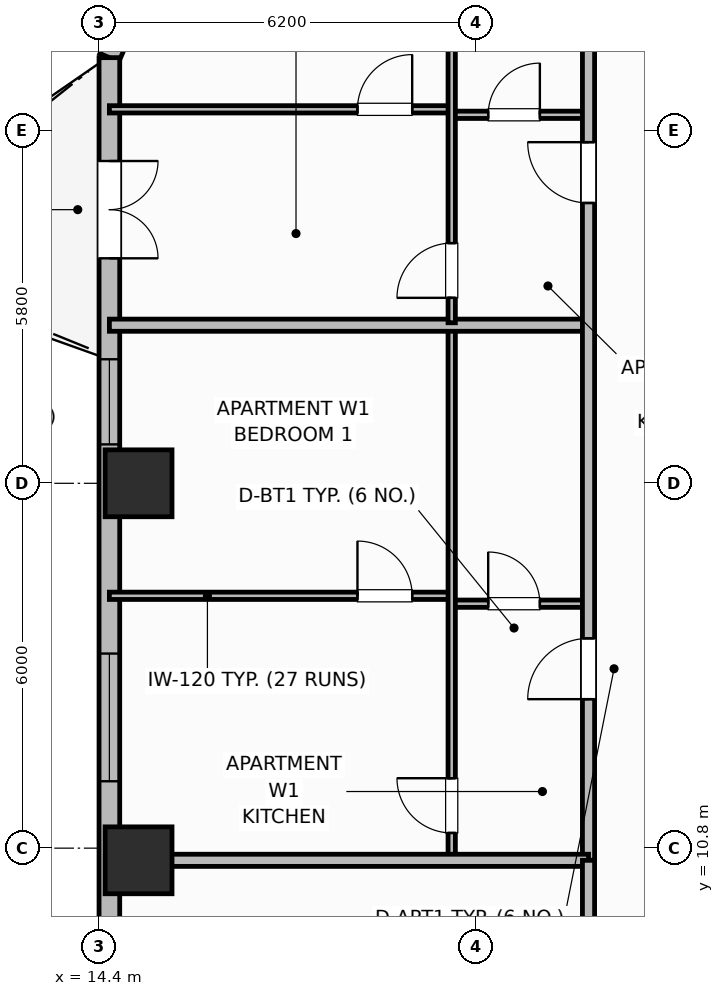
"""IFC4 building model, lengths in metres.
Left out: names, types, materials, properties, quantities, classifications, styles, units other than length and angle.
Written with IfcOpenShell. Run it as: python <this file> out.ifc"""

import sys

from ifc_helpers import new_model, si_unit, direction, frame, frame_2d, origin, origin_2d, place, context, subcontext, project, spatial, rectangle, extrude, element, fill, save


model = new_model("IFC4")
c1 = context("Model", 3, precision=1e-05, world=origin(), true_north=direction((0.0, 1.0)))
c2 = subcontext(c1, "Body", "Model", "MODEL_VIEW")
j1 = project(units=[si_unit("LENGTHUNIT", "METRE"), si_unit("PLANEANGLEUNIT", "RADIAN")], contexts=[c1])
p1 = place(None, origin())
s1 = spatial("IfcSite", under=j1, at=p1, CompositionType="ELEMENT")
p2 = place(p1, origin())
s2 = spatial("IfcBuilding", under=s1, at=p2, CompositionType="ELEMENT")
p3 = place(p2, frame((0.0, 0.0, 99.4)))
s3 = spatial("IfcBuildingStorey", under=s2, at=p3, CompositionType="ELEMENT", Elevation=99.4)
for number, where, z_axis, x_axis in (
    (1, (15.05, 10.6, 0.0), (0.0, 0.0, 1.0), (1.0, 0.0, 0.0)),
    (2, (15.05, 16.8, 0.0), (0.0, 0.0, 1.0), (1.0, 0.0, 0.0)),
):
    element("IfcColumn", number, at=place(p3, frame(where, z_axis=z_axis, x_axis=x_axis)), inside=s3, PredefinedType="COLUMN", context=c2, shape_type="SweptSolid", body=[
        extrude(rectangle(XDim=1.1, YDim=1.1, at=origin_2d()), origin(), (0.0, 0.0, 1.0), 3.7),
    ])
p4 = place(p3, frame((15.52, 26.0, 0.0), z_axis=(0.0, 0.0, 1.0), x_axis=(-0.396426258231, -0.918066567186, 0.0)))
e3 = element("IfcWall", 3, at=p4, inside=s3, PredefinedType="SOLIDWALL", context=c2, shape_type="SweptSolid", body=[
    extrude(rectangle(XDim=2.396, YDim=0.34, at=frame_2d((1.198, 0.0))), origin(), (0.0, 0.0, 1.0), 2.7),
])
p5 = place(p4, frame((0.648, 0.0, 0.89)))
e4 = element("IfcOpeningElement", 4, at=p5, cuts=e3, PredefinedType="OPENING", context=c2, shape_type="SweptSolid", body=[
    extrude(rectangle(XDim=1.1, YDim=1.65, at=frame_2d((0.55, 0.825))), frame((0.0, 0.18, 0.0), z_axis=(0.0, -1.0, 0.0), x_axis=(1.0, 0.0, 0.0)), (0.0, 0.0, 1.0), 0.36),
])
p6 = place(p3, frame((14.57, 23.8, 0.0), z_axis=(0.0, 0.0, 1.0), x_axis=(0.0, -1.0, 0.0)))
e5 = element("IfcWall", 5, at=p6, inside=s3, PredefinedType="SOLIDWALL", context=c2, shape_type="SweptSolid", body=[
    extrude(rectangle(XDim=14.8, YDim=0.34, at=frame_2d((7.4, 0.0))), origin(), (0.0, 0.0, 1.0), 2.7),
])
p7 = place(p6, frame((1.7, 0.0, 0.0)))
e6 = element("IfcOpeningElement", 6, at=p7, cuts=e5, PredefinedType="OPENING", context=c2, shape_type="SweptSolid", body=[
    extrude(rectangle(XDim=1.6, YDim=2.1, at=frame_2d((0.8, 1.05))), frame((0.0, 0.18, 0.0), z_axis=(0.0, -1.0, 0.0), x_axis=(1.0, 0.0, 0.0)), (0.0, 0.0, 1.0), 0.36),
])
p8 = place(p6, frame((4.96, 0.0, 0.69)))
e7 = element("IfcOpeningElement", 7, at=p8, cuts=e5, PredefinedType="OPENING", context=c2, shape_type="SweptSolid", body=[
    extrude(rectangle(XDim=1.4, YDim=1.85, at=frame_2d((0.7, 0.925))), frame((0.0, 0.18, 0.0), z_axis=(0.0, -1.0, 0.0), x_axis=(1.0, 0.0, 0.0)), (0.0, 0.0, 1.0), 0.36),
])
p9 = place(p6, frame((9.8, 0.0, 0.68)))
e8 = element("IfcOpeningElement", 8, at=p9, cuts=e5, PredefinedType="OPENING", context=c2, shape_type="SweptSolid", body=[
    extrude(rectangle(XDim=2.1, YDim=1.9, at=frame_2d((1.05, 0.95))), frame((0.0, 0.18, 0.0), z_axis=(0.0, -1.0, 0.0), x_axis=(1.0, 0.0, 0.0)), (0.0, 0.0, 1.0), 0.36),
])
p10 = place(p3, frame((20.2, 14.82, 0.0), z_axis=(0.0, 0.0, 1.0), x_axis=(1.0, 0.0, 0.0)))
e9 = element("IfcWall", 9, at=p10, inside=s3, PredefinedType="PARTITIONING", context=c2, shape_type="SweptSolid", body=[
    extrude(rectangle(XDim=2.25, YDim=0.12, at=frame_2d((1.125, 0.0))), origin(), (0.0, 0.0, 1.0), 2.53),
])
p11 = place(p10, frame((0.6, 0.0, 0.0)))
e10 = element("IfcOpeningElement", 10, at=p11, cuts=e9, PredefinedType="OPENING", context=c2, shape_type="SweptSolid", body=[
    extrude(rectangle(XDim=0.85, YDim=2.1, at=frame_2d((0.425, 1.05))), frame((0.0, 0.07, 0.0), z_axis=(0.0, -1.0, 0.0), x_axis=(1.0, 0.0, 0.0)), (0.0, 0.0, 1.0), 0.14),
])
p12 = place(p3, frame((14.57, 14.95, 0.0), z_axis=(0.0, 0.0, 1.0), x_axis=(1.0, 0.0, 0.0)))
e11 = element("IfcWall", 11, at=p12, inside=s3, PredefinedType="PARTITIONING", context=c2, shape_type="SweptSolid", body=[
    extrude(rectangle(XDim=5.63, YDim=0.12, at=frame_2d((2.815, 0.0))), origin(), (0.0, 0.0, 1.0), 2.53),
])
p13 = place(p12, frame((4.08, 0.0, 0.0)))
e12 = element("IfcOpeningElement", 12, at=p13, cuts=e11, PredefinedType="OPENING", context=c2, shape_type="SweptSolid", body=[
    extrude(rectangle(XDim=0.9, YDim=2.1, at=frame_2d((0.45, 1.05))), frame((0.0, 0.07, 0.0), z_axis=(0.0, -1.0, 0.0), x_axis=(1.0, 0.0, 0.0)), (0.0, 0.0, 1.0), 0.14),
])
p14 = place(p3, frame((20.2, 10.64, 0.0), z_axis=(0.0, 0.0, 1.0), x_axis=(0.0, 1.0, 0.0)))
e13 = element("IfcWall", 13, at=p14, inside=s3, PredefinedType="PARTITIONING", context=c2, shape_type="SweptSolid", body=[
    extrude(rectangle(XDim=8.72, YDim=0.12, at=frame_2d((4.36, 0.0))), origin(), (0.0, 0.0, 1.0), 2.53),
])
p15 = place(p14, frame((0.41, 0.0, 0.0)))
e14 = element("IfcOpeningElement", 14, at=p15, cuts=e13, PredefinedType="OPENING", context=c2, shape_type="SweptSolid", body=[
    extrude(rectangle(XDim=0.9, YDim=2.1, at=frame_2d((0.45, 1.05))), frame((0.0, 0.07, 0.0), z_axis=(0.0, -1.0, 0.0), x_axis=(1.0, 0.0, 0.0)), (0.0, 0.0, 1.0), 0.14),
])
p16 = place(p3, frame((14.57, 19.4, 0.0), z_axis=(0.0, 0.0, 1.0), x_axis=(1.0, 0.0, 0.0)))
e15 = element("IfcWall", 15, at=p16, inside=s3, PredefinedType="PARTITIONING", context=c2, shape_type="SweptSolid", body=[
    extrude(rectangle(XDim=7.88, YDim=0.2, at=frame_2d((3.94, 0.0))), origin(), (0.0, 0.0, 1.0), 2.53),
])
p17 = place(p3, frame((20.2, 22.86, 0.0), z_axis=(0.0, 0.0, 1.0), x_axis=(1.0, 0.0, 0.0)))
e16 = element("IfcWall", 16, at=p17, inside=s3, PredefinedType="PARTITIONING", context=c2, shape_type="SweptSolid", body=[
    extrude(rectangle(XDim=2.25, YDim=0.12, at=frame_2d((1.125, 0.0))), origin(), (0.0, 0.0, 1.0), 2.53),
])
p18 = place(p17, frame((0.6, 0.0, 0.0)))
e17 = element("IfcOpeningElement", 17, at=p18, cuts=e16, PredefinedType="OPENING", context=c2, shape_type="SweptSolid", body=[
    extrude(rectangle(XDim=0.85, YDim=2.1, at=frame_2d((0.425, 1.05))), frame((0.0, 0.07, 0.0), z_axis=(0.0, -1.0, 0.0), x_axis=(1.0, 0.0, 0.0)), (0.0, 0.0, 1.0), 0.14),
])
p19 = place(p3, frame((14.57, 22.95, 0.0), z_axis=(0.0, 0.0, 1.0), x_axis=(1.0, 0.0, 0.0)))
e18 = element("IfcWall", 18, at=p19, inside=s3, PredefinedType="PARTITIONING", context=c2, shape_type="SweptSolid", body=[
    extrude(rectangle(XDim=5.63, YDim=0.12, at=frame_2d((2.815, 0.0))), origin(), (0.0, 0.0, 1.0), 2.53),
])
p20 = place(p19, frame((4.08, 0.0, 0.0)))
e19 = element("IfcOpeningElement", 19, at=p20, cuts=e18, PredefinedType="OPENING", context=c2, shape_type="SweptSolid", body=[
    extrude(rectangle(XDim=0.9, YDim=2.1, at=frame_2d((0.45, 1.05))), frame((0.0, 0.07, 0.0), z_axis=(0.0, -1.0, 0.0), x_axis=(1.0, 0.0, 0.0)), (0.0, 0.0, 1.0), 0.14),
])
p21 = place(p3, frame((20.2, 19.44, 0.0), z_axis=(0.0, 0.0, 1.0), x_axis=(0.0, 1.0, 0.0)))
e20 = element("IfcWall", 20, at=p21, inside=s3, PredefinedType="PARTITIONING", context=c2, shape_type="SweptSolid", body=[
    extrude(rectangle(XDim=7.12, YDim=0.12, at=frame_2d((3.56, 0.0))), origin(), (0.0, 0.0, 1.0), 2.53),
])
p22 = place(p21, frame((0.41, 0.0, 0.0)))
e21 = element("IfcOpeningElement", 21, at=p22, cuts=e20, PredefinedType="OPENING", context=c2, shape_type="SweptSolid", body=[
    extrude(rectangle(XDim=0.9, YDim=2.1, at=frame_2d((0.45, 1.05))), frame((0.0, 0.07, 0.0), z_axis=(0.0, -1.0, 0.0), x_axis=(1.0, 0.0, 0.0)), (0.0, 0.0, 1.0), 0.14),
])
p23 = place(p3, frame((22.45, 10.6, 0.0), z_axis=(0.0, 0.0, 1.0), x_axis=(0.0, 1.0, 0.0)))
e22 = element("IfcWall", 22, at=p23, inside=s3, PredefinedType="PARTITIONING", context=c2, shape_type="SweptSolid", body=[
    extrude(rectangle(XDim=35.2, YDim=0.2, at=frame_2d((17.6, 0.0))), origin(), (0.0, 0.0, 1.0), 2.53),
])
p24 = place(p23, frame((2.65, 0.0, 0.0)))
e23 = element("IfcOpeningElement", 23, at=p24, cuts=e22, PredefinedType="OPENING", context=c2, shape_type="SweptSolid", body=[
    extrude(rectangle(XDim=1.0, YDim=2.15, at=frame_2d((0.5, 1.075))), frame((0.0, 0.11, 0.0), z_axis=(0.0, -1.0, 0.0), x_axis=(1.0, 0.0, 0.0)), (0.0, 0.0, 1.0), 0.22),
])
p25 = place(p23, frame((10.81, 0.0, 0.0)))
e24 = element("IfcOpeningElement", 24, at=p25, cuts=e22, PredefinedType="OPENING", context=c2, shape_type="SweptSolid", body=[
    extrude(rectangle(XDim=1.0, YDim=2.15, at=frame_2d((0.5, 1.075))), frame((0.0, 0.11, 0.0), z_axis=(0.0, -1.0, 0.0), x_axis=(1.0, 0.0, 0.0)), (0.0, 0.0, 1.0), 0.22),
])
p26 = place(p23, frame((19.54, 0.0, 0.0)))
e25 = element("IfcOpeningElement", 25, at=p26, cuts=e22, PredefinedType="OPENING", context=c2, shape_type="SweptSolid", body=[
    extrude(rectangle(XDim=1.0, YDim=2.15, at=frame_2d((0.5, 1.075))), frame((0.0, 0.11, 0.0), z_axis=(0.0, -1.0, 0.0), x_axis=(1.0, 0.0, 0.0)), (0.0, 0.0, 1.0), 0.22),
])
p27 = place(p23, frame((26.95, 0.0, 0.0)))
e26 = element("IfcOpeningElement", 26, at=p27, cuts=e22, PredefinedType="OPENING", context=c2, shape_type="SweptSolid", body=[
    extrude(rectangle(XDim=1.0, YDim=2.15, at=frame_2d((0.5, 1.075))), frame((0.0, 0.11, 0.0), z_axis=(0.0, -1.0, 0.0), x_axis=(1.0, 0.0, 0.0)), (0.0, 0.0, 1.0), 0.22),
])
p28 = place(p3, frame((14.99, 10.6, 0.0), z_axis=(0.0, 0.0, 1.0), x_axis=(1.0, 0.0, 0.0)))
e27 = element("IfcWall", 27, at=p28, inside=s3, PredefinedType="PARTITIONING", context=c2, shape_type="SweptSolid", body=[
    extrude(rectangle(XDim=7.46, YDim=0.2, at=frame_2d((3.73, 0.0))), origin(), (0.0, 0.0, 1.0), 2.53),
])
p29 = place(p3, frame((22.45, 4.97, 0.0), z_axis=(0.0, 0.0, 1.0), x_axis=(0.0, 1.0, 0.0)))
e28 = element("IfcWall", 28, at=p29, inside=s3, PredefinedType="PARTITIONING", context=c2, shape_type="SweptSolid", body=[
    extrude(rectangle(XDim=5.63, YDim=0.2, at=frame_2d((2.815, 0.0))), origin(), (0.0, 0.0, 1.0), 2.53),
])
p30 = place(p7, origin())
e29 = element("IfcDoor", 29, at=p30, inside=s3, OperationType="DOUBLE_DOOR_SINGLE_SWING", PredefinedType="DOOR", context=c2, shape_type="SweptSolid", body=[
    extrude(rectangle(XDim=1.6, YDim=2.1, at=frame_2d((0.8, 1.05))), frame((0.0, 0.025, 0.0), z_axis=(0.0, -1.0, 0.0), x_axis=(1.0, 0.0, 0.0)), (0.0, 0.0, 1.0), 0.05),
])
fill(e6, e29)
p31 = place(p8, origin())
e30 = element("IfcWindow", 30, at=p31, inside=s3, PartitioningType="SINGLE_PANEL", PredefinedType="WINDOW", context=c2, shape_type="SweptSolid", body=[
    extrude(rectangle(XDim=1.4, YDim=1.85, at=frame_2d((0.7, 0.925))), frame((0.0, 0.03, 0.0), z_axis=(0.0, -1.0, 0.0), x_axis=(1.0, 0.0, 0.0)), (0.0, 0.0, 1.0), 0.06),
])
fill(e7, e30)
p32 = place(p9, origin())
e31 = element("IfcWindow", 31, at=p32, inside=s3, PartitioningType="SINGLE_PANEL", PredefinedType="WINDOW", context=c2, shape_type="SweptSolid", body=[
    extrude(rectangle(XDim=2.1, YDim=1.9, at=frame_2d((1.05, 0.95))), frame((0.0, 0.03, 0.0), z_axis=(0.0, -1.0, 0.0), x_axis=(1.0, 0.0, 0.0)), (0.0, 0.0, 1.0), 0.06),
])
fill(e8, e31)
p33 = place(p11, origin())
e32 = element("IfcDoor", 32, at=p33, inside=s3, OperationType="SINGLE_SWING_LEFT", PredefinedType="DOOR", context=c2, shape_type="SweptSolid", body=[
    extrude(rectangle(XDim=0.85, YDim=2.1, at=frame_2d((0.425, 1.05))), frame((0.0, 0.025, 0.0), z_axis=(0.0, -1.0, 0.0), x_axis=(1.0, 0.0, 0.0)), (0.0, 0.0, 1.0), 0.05),
])
fill(e10, e32)
p34 = place(p13, origin())
e33 = element("IfcDoor", 33, at=p34, inside=s3, OperationType="SINGLE_SWING_LEFT", PredefinedType="DOOR", context=c2, shape_type="SweptSolid", body=[
    extrude(rectangle(XDim=0.9, YDim=2.1, at=frame_2d((0.45, 1.05))), frame((0.0, 0.025, 0.0), z_axis=(0.0, -1.0, 0.0), x_axis=(1.0, 0.0, 0.0)), (0.0, 0.0, 1.0), 0.05),
])
fill(e12, e33)
p35 = place(p15, origin())
e34 = element("IfcDoor", 34, at=p35, inside=s3, OperationType="SINGLE_SWING_RIGHT", PredefinedType="DOOR", context=c2, shape_type="SweptSolid", body=[
    extrude(rectangle(XDim=0.9, YDim=2.1, at=frame_2d((0.45, 1.05))), frame((0.0, 0.025, 0.0), z_axis=(0.0, -1.0, 0.0), x_axis=(1.0, 0.0, 0.0)), (0.0, 0.0, 1.0), 0.05),
])
fill(e14, e34)
p36 = place(p18, origin())
e35 = element("IfcDoor", 35, at=p36, inside=s3, OperationType="SINGLE_SWING_RIGHT", PredefinedType="DOOR", context=c2, shape_type="SweptSolid", body=[
    extrude(rectangle(XDim=0.85, YDim=2.1, at=frame_2d((0.425, 1.05))), frame((0.0, 0.025, 0.0), z_axis=(0.0, -1.0, 0.0), x_axis=(1.0, 0.0, 0.0)), (0.0, 0.0, 1.0), 0.05),
])
fill(e17, e35)
p37 = place(p20, origin())
e36 = element("IfcDoor", 36, at=p37, inside=s3, OperationType="SINGLE_SWING_RIGHT", PredefinedType="DOOR", context=c2, shape_type="SweptSolid", body=[
    extrude(rectangle(XDim=0.9, YDim=2.1, at=frame_2d((0.45, 1.05))), frame((0.0, 0.025, 0.0), z_axis=(0.0, -1.0, 0.0), x_axis=(1.0, 0.0, 0.0)), (0.0, 0.0, 1.0), 0.05),
])
fill(e19, e36)
p38 = place(p22, origin())
e37 = element("IfcDoor", 37, at=p38, inside=s3, OperationType="SINGLE_SWING_LEFT", PredefinedType="DOOR", context=c2, shape_type="SweptSolid", body=[
    extrude(rectangle(XDim=0.9, YDim=2.1, at=frame_2d((0.45, 1.05))), frame((0.0, 0.025, 0.0), z_axis=(0.0, -1.0, 0.0), x_axis=(1.0, 0.0, 0.0)), (0.0, 0.0, 1.0), 0.05),
])
fill(e21, e37)
p39 = place(p24, origin())
e38 = element("IfcDoor", 38, at=p39, inside=s3, OperationType="SINGLE_SWING_LEFT", PredefinedType="DOOR", context=c2, shape_type="SweptSolid", body=[
    extrude(rectangle(XDim=1.0, YDim=2.15, at=frame_2d((0.5, 1.075))), frame((0.0, 0.025, 0.0), z_axis=(0.0, -1.0, 0.0), x_axis=(1.0, 0.0, 0.0)), (0.0, 0.0, 1.0), 0.05),
])
fill(e23, e38)
p40 = place(p25, origin())
e39 = element("IfcDoor", 39, at=p40, inside=s3, OperationType="SINGLE_SWING_RIGHT", PredefinedType="DOOR", context=c2, shape_type="SweptSolid", body=[
    extrude(rectangle(XDim=1.0, YDim=2.15, at=frame_2d((0.5, 1.075))), frame((0.0, 0.025, 0.0), z_axis=(0.0, -1.0, 0.0), x_axis=(1.0, 0.0, 0.0)), (0.0, 0.0, 1.0), 0.05),
])
fill(e24, e39)
save(model, sys.argv[1])
